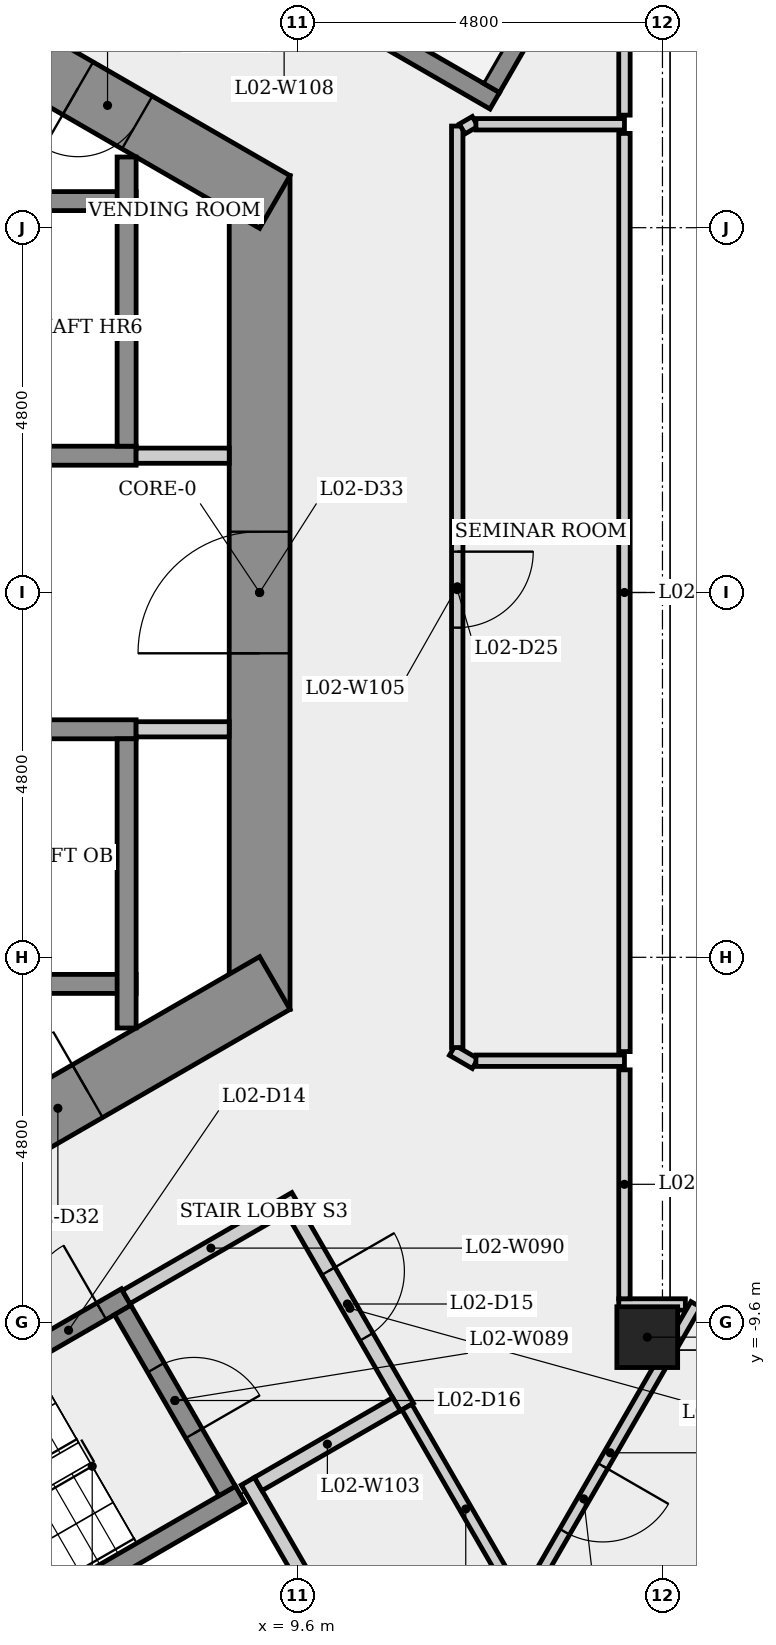
"""IFC4 building model, lengths in metres.
Left out: names, types, materials, properties, quantities, classifications, styles, units other than length and angle.
Written with IfcOpenShell. Run it as: python <this file> out.ifc"""

import sys

from ifc_helpers import new_model, si_unit, direction, frame, frame_2d, origin, origin_2d, place, context, subcontext, project, spatial, rectangle, extrude, element, fill, save


model = new_model("IFC4")
c1 = context("Model", 3, precision=1e-05, world=origin(), true_north=direction((0.0, 1.0)))
c2 = subcontext(c1, "Body", "Model", "MODEL_VIEW")
j1 = project(units=[si_unit("LENGTHUNIT", "METRE"), si_unit("PLANEANGLEUNIT", "RADIAN")], contexts=[c1])
p1 = place(None, origin())
s1 = spatial("IfcSite", under=j1, at=p1, CompositionType="ELEMENT")
p2 = place(p1, origin())
s2 = spatial("IfcBuilding", under=s1, at=p2, CompositionType="ELEMENT")
p3 = place(p2, frame((0.0, 0.0, 11.5)))
s3 = spatial("IfcBuildingStorey", under=s2, at=p3, CompositionType="ELEMENT", Elevation=11.5)
p4 = place(p3, frame((9.1, -5.485, 0.0), z_axis=(0.0, 0.0, 1.0), x_axis=(0.0, 1.0, 0.0)))
e1 = element("IfcWall", 1, at=p4, inside=s3, PredefinedType="SHEAR", context=c2, shape_type="SweptSolid", body=[
    extrude(rectangle(XDim=10.97, YDim=0.8, at=frame_2d((5.485, 0.0))), origin(), (0.0, 0.0, 1.0), 4.5),
])
p5 = place(p4, frame((4.685, 0.0, 0.0)))
e2 = element("IfcOpeningElement", 2, at=p5, cuts=e1, PredefinedType="OPENING", context=c2, shape_type="SweptSolid", body=[
    extrude(rectangle(XDim=1.6, YDim=2.1, at=frame_2d((0.8, 1.05))), frame((0.0, 0.41, 0.0), z_axis=(0.0, -1.0, 0.0), x_axis=(1.0, 0.0, 0.0)), (0.0, 0.0, 1.0), 0.82),
])
p6 = place(p3, frame((9.3, 5.138, 0.0), z_axis=(0.0, 0.0, 1.0), x_axis=(-0.866023993627, 0.500002442456, 0.0)))
e3 = element("IfcWall", 3, at=p6, inside=s3, PredefinedType="SHEAR", context=c2, shape_type="SweptSolid", body=[
    extrude(rectangle(XDim=10.97, YDim=0.8, at=frame_2d((5.485, 0.0))), origin(), (0.0, 0.0, 1.0), 4.5),
])
p7 = place(p6, frame((8.326, 0.0, 0.0)))
e4 = element("IfcOpeningElement", 4, at=p7, cuts=e3, PredefinedType="OPENING", context=c2, shape_type="SweptSolid", body=[
    extrude(rectangle(XDim=0.9, YDim=2.1, at=frame_2d((0.45, 1.05))), frame((0.0, 0.41, 0.0), z_axis=(0.0, -1.0, 0.0), x_axis=(1.0, 0.0, 0.0)), (0.0, 0.0, 1.0), 0.82),
])
p8 = place(p6, frame((2.091, 0.0, 0.0)))
e5 = element("IfcOpeningElement", 5, at=p8, cuts=e3, PredefinedType="OPENING", context=c2, shape_type="SweptSolid", body=[
    extrude(rectangle(XDim=0.9, YDim=2.1, at=frame_2d((0.45, 1.05))), frame((0.0, 0.41, 0.0), z_axis=(0.0, -1.0, 0.0), x_axis=(1.0, 0.0, 0.0)), (0.0, 0.0, 1.0), 0.82),
])
p9 = place(p3, frame((-0.2, -10.623, 0.0), z_axis=(0.0, 0.0, 1.0), x_axis=(0.866023993627, 0.500002442456, 0.0)))
e6 = element("IfcWall", 6, at=p9, inside=s3, PredefinedType="SHEAR", context=c2, shape_type="SweptSolid", body=[
    extrude(rectangle(XDim=10.97, YDim=0.8, at=frame_2d((5.485, 0.0))), origin(), (0.0, 0.0, 1.0), 4.5),
])
p10 = place(p9, frame((7.224, 0.0, 0.0)))
e7 = element("IfcOpeningElement", 7, at=p10, cuts=e6, PredefinedType="OPENING", context=c2, shape_type="SweptSolid", body=[
    extrude(rectangle(XDim=0.9, YDim=2.1, at=frame_2d((0.45, 1.05))), frame((0.0, 0.41, 0.0), z_axis=(0.0, -1.0, 0.0), x_axis=(1.0, 0.0, 0.0)), (0.0, 0.0, 1.0), 0.82),
])
p11 = place(p3, frame((14.2, -9.798, 0.0), z_axis=(0.0, 0.0, 1.0), x_axis=(1.0, 0.0, 0.0)))
e8 = element("IfcColumn", 8, at=p11, inside=s3, PredefinedType="COLUMN", context=c2, shape_type="SweptSolid", body=[
    extrude(rectangle(XDim=0.8, YDim=0.8, at=origin_2d()), origin(), (0.0, 0.0, 1.0), 4.5),
])
p12 = place(p3, frame((-7.475, 1.8, 0.0), z_axis=(0.0, 0.0, 1.0), x_axis=(1.0, 0.0, 0.0)))
e9 = element("IfcWall", 9, at=p12, inside=s3, PredefinedType="SHEAR", context=c2, shape_type="SweptSolid", body=[
    extrude(rectangle(XDim=14.95, YDim=0.25, at=frame_2d((7.475, 0.0))), origin(), (0.0, 0.0, 1.0), 4.1),
])
for number, where, z_axis, x_axis in (
    (10, (-7.225, 5.15, 0.0), (0.0, 0.0, 1.0), (1.0, 0.0, 0.0)),
    (11, (-7.225, -5.15, 0.0), (0.0, 0.0, 1.0), (1.0, 0.0, 0.0)),
):
    element("IfcWall", number, at=place(p3, frame(where, z_axis=z_axis, x_axis=x_axis)), inside=s3, PredefinedType="SHEAR", context=c2, shape_type="SweptSolid", body=[
        extrude(rectangle(XDim=14.7, YDim=0.25, at=frame_2d((7.35, 0.0))), origin(), (0.0, 0.0, 1.0), 4.1),
    ])
p13 = place(p3, frame((-7.225, -1.8, 0.0), z_axis=(0.0, 0.0, 1.0), x_axis=(1.0, 0.0, 0.0)))
e12 = element("IfcWall", 12, at=p13, inside=s3, PredefinedType="SHEAR", context=c2, shape_type="SweptSolid", body=[
    extrude(rectangle(XDim=14.7, YDim=0.25, at=frame_2d((7.35, 0.0))), origin(), (0.0, 0.0, 1.0), 4.1),
])
p14 = place(p13, frame((0.597, 0.0, 0.0)))
e13 = element("IfcOpeningElement", 13, at=p14, cuts=e12, PredefinedType="OPENING", context=c2, shape_type="SweptSolid", body=[
    extrude(rectangle(XDim=1.1, YDim=2.1, at=frame_2d((0.55, 1.05))), frame((0.0, 0.135, 0.0), z_axis=(0.0, -1.0, 0.0), x_axis=(1.0, 0.0, 0.0)), (0.0, 0.0, 1.0), 0.27),
])
p15 = place(p13, frame((3.0, 0.0, 0.0)))
e14 = element("IfcOpeningElement", 14, at=p15, cuts=e12, PredefinedType="OPENING", context=c2, shape_type="SweptSolid", body=[
    extrude(rectangle(XDim=1.1, YDim=2.1, at=frame_2d((0.55, 1.05))), frame((0.0, 0.135, 0.0), z_axis=(0.0, -1.0, 0.0), x_axis=(1.0, 0.0, 0.0)), (0.0, 0.0, 1.0), 0.27),
])
p16 = place(p13, frame((5.45, 0.0, 0.0)))
e15 = element("IfcOpeningElement", 15, at=p16, cuts=e12, PredefinedType="OPENING", context=c2, shape_type="SweptSolid", body=[
    extrude(rectangle(XDim=1.1, YDim=2.1, at=frame_2d((0.55, 1.05))), frame((0.0, 0.135, 0.0), z_axis=(0.0, -1.0, 0.0), x_axis=(1.0, 0.0, 0.0)), (0.0, 0.0, 1.0), 0.27),
])
p17 = place(p13, frame((7.9, 0.0, 0.0)))
e16 = element("IfcOpeningElement", 16, at=p17, cuts=e12, PredefinedType="OPENING", context=c2, shape_type="SweptSolid", body=[
    extrude(rectangle(XDim=1.1, YDim=2.1, at=frame_2d((0.55, 1.05))), frame((0.0, 0.135, 0.0), z_axis=(0.0, -1.0, 0.0), x_axis=(1.0, 0.0, 0.0)), (0.0, 0.0, 1.0), 0.27),
])
p18 = place(p13, frame((10.35, 0.0, 0.0)))
e17 = element("IfcOpeningElement", 17, at=p18, cuts=e12, PredefinedType="OPENING", context=c2, shape_type="SweptSolid", body=[
    extrude(rectangle(XDim=1.1, YDim=2.1, at=frame_2d((0.55, 1.05))), frame((0.0, 0.135, 0.0), z_axis=(0.0, -1.0, 0.0), x_axis=(1.0, 0.0, 0.0)), (0.0, 0.0, 1.0), 0.27),
])
p19 = place(p3, frame((1.585, -12.595, 0.0), z_axis=(0.0, 0.0, 1.0), x_axis=(0.866036417653, 0.499980922934, 0.0)))
e18 = element("IfcWall", 18, at=p19, inside=s3, PredefinedType="SHEAR", context=c2, shape_type="SweptSolid", body=[
    extrude(rectangle(XDim=6.65, YDim=0.25, at=frame_2d((3.325, 0.0))), origin(), (0.0, 0.0, 1.0), 4.1),
])
p20 = place(p19, frame((5.275, 0.0, 0.0)))
e19 = element("IfcOpeningElement", 19, at=p20, cuts=e18, PredefinedType="OPENING", context=c2, shape_type="SweptSolid", body=[
    extrude(rectangle(XDim=1.0, YDim=2.1, at=frame_2d((0.5, 1.05))), frame((0.0, 0.135, 0.0), z_axis=(0.0, -1.0, 0.0), x_axis=(1.0, 0.0, 0.0)), (0.0, 0.0, 1.0), 0.27),
])
p21 = place(p3, frame((3.301, -15.068, 0.0), z_axis=(0.0, 0.0, 1.0), x_axis=(0.866035036182, 0.499983315828, 0.0)))
e20 = element("IfcWall", 20, at=p21, inside=s3, PredefinedType="SHEAR", context=c2, shape_type="SweptSolid", body=[
    extrude(rectangle(XDim=6.4, YDim=0.25, at=frame_2d((3.2, 0.0))), origin(), (0.0, 0.0, 1.0), 4.1),
])
p22 = place(p3, frame((7.298, -9.441, 0.0), z_axis=(0.0, 0.0, 1.0), x_axis=(0.500034990121, -0.866005201286, 0.0)))
e21 = element("IfcWall", 21, at=p22, inside=s3, PredefinedType="SHEAR", context=c2, shape_type="SweptSolid", body=[
    extrude(rectangle(XDim=2.75, YDim=0.25, at=frame_2d((1.375, 0.0))), origin(), (0.0, 0.0, 1.0), 4.1),
])
p23 = place(p22, frame((0.875, 0.0, 0.0)))
e22 = element("IfcOpeningElement", 22, at=p23, cuts=e21, PredefinedType="OPENING", context=c2, shape_type="SweptSolid", body=[
    extrude(rectangle(XDim=1.0, YDim=2.1, at=frame_2d((0.5, 1.05))), frame((0.0, 0.135, 0.0), z_axis=(0.0, -1.0, 0.0), x_axis=(1.0, 0.0, 0.0)), (0.0, 0.0, 1.0), 0.27),
])
p24 = place(p3, frame((7.344, -9.27, 0.0), z_axis=(0.0, 0.0, 1.0), x_axis=(0.866005588531, 0.500034319456, 0.0)))
e23 = element("IfcWall", 23, at=p24, inside=s3, PredefinedType="PARTITIONING", context=c2, shape_type="SweptSolid", body=[
    extrude(rectangle(XDim=2.575, YDim=0.2, at=frame_2d((1.288, 0.0))), origin(), (0.0, 0.0, 1.0), 4.1),
])
p25 = place(p3, frame((7.475, 1.8, 0.0), z_axis=(0.0, 0.0, 1.0), x_axis=(1.0, 0.0, 0.0)))
e24 = element("IfcWall", 24, at=p25, inside=s3, PredefinedType="PARTITIONING", context=c2, shape_type="SweptSolid", body=[
    extrude(rectangle(XDim=1.225, YDim=0.2, at=frame_2d((0.613, 0.0))), origin(), (0.0, 0.0, 1.0), 4.1),
])
for number, where, z_axis, x_axis in (
    (25, (7.35, -1.925, 0.0), (0.0, 0.0, 1.0), (0.0, -1.0, 0.0)),
    (26, (7.35, 5.73, 0.0), (0.0, 0.0, 1.0), (0.0, -1.0, 0.0)),
):
    element("IfcWall", number, at=place(p3, frame(where, z_axis=z_axis, x_axis=x_axis)), inside=s3, PredefinedType="SHEAR", context=c2, shape_type="SweptSolid", body=[
        extrude(rectangle(XDim=3.805, YDim=0.25, at=frame_2d((1.903, 0.0))), origin(), (0.0, 0.0, 1.0), 4.1),
    ])
p26 = place(p3, frame((8.7, -1.8, 0.0), z_axis=(0.0, 0.0, 1.0), x_axis=(-1.0, 0.0, 0.0)))
e27 = element("IfcWall", 27, at=p26, inside=s3, PredefinedType="PARTITIONING", context=c2, shape_type="SweptSolid", body=[
    extrude(rectangle(XDim=1.225, YDim=0.2, at=frame_2d((0.613, 0.0))), origin(), (0.0, 0.0, 1.0), 4.1),
])
p27 = place(p3, frame((8.945, -11.694, 0.0), z_axis=(0.0, 0.0, 1.0), x_axis=(0.500062241894, -0.865989465428, 0.0)))
e28 = element("IfcWall", 28, at=p27, inside=s3, PredefinedType="PLUMBINGWALL", context=c2, shape_type="SweptSolid", body=[
    extrude(rectangle(XDim=3.4, YDim=0.2, at=frame_2d((1.7, 0.0))), origin(), (0.0, 0.0, 1.0), 4.1),
])
p28 = place(p3, frame((9.537, -8.119, 0.0), z_axis=(0.0, 0.0, 1.0), x_axis=(0.499990139034, -0.866031096941, 0.0)))
e29 = element("IfcWall", 29, at=p28, inside=s3, PredefinedType="PARTITIONING", context=c2, shape_type="SweptSolid", body=[
    extrude(rectangle(XDim=3.0, YDim=0.2, at=frame_2d((1.5, 0.0))), origin(), (0.0, 0.0, 1.0), 4.1),
])
p29 = place(p28, frame((0.935, 0.0, 0.0)))
e30 = element("IfcOpeningElement", 30, at=p29, cuts=e29, PredefinedType="OPENING", context=c2, shape_type="SweptSolid", body=[
    extrude(rectangle(XDim=1.0, YDim=2.1, at=frame_2d((0.5, 1.05))), frame((0.0, 0.11, 0.0), z_axis=(0.0, -1.0, 0.0), x_axis=(1.0, 0.0, 0.0)), (0.0, 0.0, 1.0), 0.22),
])
p30 = place(p3, frame((10.901, -10.681, 0.0), z_axis=(0.0, 0.0, 1.0), x_axis=(-0.866009402589, -0.500027713859, 0.0)))
e31 = element("IfcWall", 31, at=p30, inside=s3, PredefinedType="PARTITIONING", context=c2, shape_type="SweptSolid", body=[
    extrude(rectangle(XDim=2.1, YDim=0.2, at=frame_2d((1.05, 0.0))), origin(), (0.0, 0.0, 1.0), 4.1),
])
p31 = place(p3, frame((11.635, -6.025, 0.0), z_axis=(0.0, 0.0, 1.0), x_axis=(0.866115353951, -0.499844169366, 0.0)))
e32 = element("IfcWall", 32, at=p31, inside=s3, PredefinedType="PARTITIONING", context=c2, shape_type="SweptSolid", body=[
    extrude(rectangle(XDim=0.347, YDim=0.15, at=frame_2d((0.174, 0.0))), origin(), (0.0, 0.0, 1.0), 4.1),
])
p32 = place(p3, frame((11.7, 6.137, 0.0), z_axis=(0.0, 0.0, 1.0), x_axis=(0.0, -1.0, 0.0)))
e33 = element("IfcWall", 33, at=p32, inside=s3, PredefinedType="PARTITIONING", context=c2, shape_type="SweptSolid", body=[
    extrude(rectangle(XDim=12.125, YDim=0.15, at=frame_2d((6.062, 0.0))), origin(), (0.0, 0.0, 1.0), 4.1),
])
p33 = place(p32, frame((5.6, 0.0, 0.0)))
e34 = element("IfcOpeningElement", 34, at=p33, cuts=e33, PredefinedType="OPENING", context=c2, shape_type="SweptSolid", body=[
    extrude(rectangle(XDim=1.0, YDim=2.1, at=frame_2d((0.5, 1.05))), frame((0.0, 0.085, 0.0), z_axis=(0.0, -1.0, 0.0), x_axis=(1.0, 0.0, 0.0)), (0.0, 0.0, 1.0), 0.17),
])
p34 = place(p3, frame((11.946, -6.161, 0.0), z_axis=(0.0, 0.0, 1.0), x_axis=(1.0, 0.0, 0.0)))
e35 = element("IfcWall", 35, at=p34, inside=s3, PredefinedType="PARTITIONING", context=c2, shape_type="SweptSolid", body=[
    extrude(rectangle(XDim=1.954, YDim=0.15, at=frame_2d((0.977, 0.0))), origin(), (0.0, 0.0, 1.0), 4.1),
])
p35 = place(p3, frame((11.936, 6.198, 0.0), z_axis=(0.0, 0.0, 1.0), x_axis=(-0.866103179807, -0.499865263774, 0.0)))
e36 = element("IfcWall", 36, at=p35, inside=s3, PredefinedType="PARTITIONING", context=c2, shape_type="SweptSolid", body=[
    extrude(rectangle(XDim=0.197, YDim=0.15, at=frame_2d((0.099, 0.0))), origin(), (0.0, 0.0, 1.0), 4.1),
])
p36 = place(p3, frame((12.194, 6.47, 0.0), z_axis=(0.0, 0.0, 1.0), x_axis=(-0.866025499775, 0.499999833739, 0.0)))
e37 = element("IfcWall", 37, at=p36, inside=s3, PredefinedType="SHEAR", context=c2, shape_type="SweptSolid", body=[
    extrude(rectangle(XDim=6.4, YDim=0.25, at=frame_2d((3.2, 0.0))), origin(), (0.0, 0.0, 1.0), 4.1),
])
p37 = place(p36, frame((5.25, 0.0, 0.0)))
e38 = element("IfcOpeningElement", 38, at=p37, cuts=e37, PredefinedType="OPENING", context=c2, shape_type="SweptSolid", body=[
    extrude(rectangle(XDim=1.0, YDim=2.1, at=frame_2d((0.5, 1.05))), frame((0.0, 0.135, 0.0), z_axis=(0.0, -1.0, 0.0), x_axis=(1.0, 0.0, 0.0)), (0.0, 0.0, 1.0), 0.27),
])
p38 = place(p3, frame((12.587, -13.401, 0.0), z_axis=(0.0, 0.0, 1.0), x_axis=(-0.499952049853, 0.866053086045, 0.0)))
e39 = element("IfcWall", 39, at=p38, inside=s3, PredefinedType="PARTITIONING", context=c2, shape_type="SweptSolid", body=[
    extrude(rectangle(XDim=3.099, YDim=0.15, at=frame_2d((1.549, 0.0))), origin(), (0.0, 0.0, 1.0), 4.1),
])
p39 = place(p3, frame((13.755, 9.424, 0.0), z_axis=(0.0, 0.0, 1.0), x_axis=(-0.500011789842, -0.866018596809, 0.0)))
e40 = element("IfcWall", 40, at=p39, inside=s3, PredefinedType="SHEAR", context=c2, shape_type="SweptSolid", body=[
    extrude(rectangle(XDim=3.214, YDim=0.25, at=frame_2d((1.607, 0.0))), origin(), (0.0, 0.0, 1.0), 4.1),
])
p40 = place(p3, frame((13.825, -9.368, 0.0), z_axis=(0.0, 0.0, 1.0), x_axis=(1.0, 0.0, 0.0)))
e41 = element("IfcWall", 41, at=p40, inside=s3, PredefinedType="PARTITIONING", context=c2, shape_type="SweptSolid", body=[
    extrude(rectangle(XDim=0.877, YDim=0.15, at=frame_2d((0.438, 0.0))), origin(), (0.0, 0.0, 1.0), 3.175),
])
p41 = place(p3, frame((13.9, -6.281, 0.0), z_axis=(0.0, 0.0, 1.0), x_axis=(0.0, -1.0, 0.0)))
e42 = element("IfcWall", 42, at=p41, inside=s3, PredefinedType="PARTITIONING", context=c2, shape_type="SweptSolid", body=[
    extrude(rectangle(XDim=3.012, YDim=0.15, at=frame_2d((1.506, 0.0))), origin(), (0.0, 0.0, 1.0), 3.175),
])
p42 = place(p3, frame((13.9, 6.041, 0.0), z_axis=(0.0, 0.0, 1.0), x_axis=(0.0, -1.0, 0.0)))
e43 = element("IfcWall", 43, at=p42, inside=s3, PredefinedType="PARTITIONING", context=c2, shape_type="SweptSolid", body=[
    extrude(rectangle(XDim=12.082, YDim=0.15, at=frame_2d((6.041, 0.0))), origin(), (0.0, 0.0, 1.0), 3.175),
])
p43 = place(p3, frame((13.9, 6.161, 0.0), z_axis=(0.0, 0.0, 1.0), x_axis=(-1.0, 0.0, 0.0)))
e44 = element("IfcWall", 44, at=p43, inside=s3, PredefinedType="PARTITIONING", context=c2, shape_type="SweptSolid", body=[
    extrude(rectangle(XDim=1.954, YDim=0.15, at=frame_2d((0.977, 0.0))), origin(), (0.0, 0.0, 1.0), 4.1),
])
p44 = place(p3, frame((13.9, 9.443, 0.0), z_axis=(0.0, 0.0, 1.0), x_axis=(0.0, -1.0, 0.0)))
e45 = element("IfcWall", 45, at=p44, inside=s3, PredefinedType="PARTITIONING", context=c2, shape_type="SweptSolid", body=[
    extrude(rectangle(XDim=3.162, YDim=0.15, at=frame_2d((1.581, 0.0))), origin(), (0.0, 0.0, 1.0), 3.175),
])
p45 = place(p3, frame((14.84, -9.368, 0.0), z_axis=(0.0, 0.0, 1.0), x_axis=(-0.49999598783, -0.866027720199, 0.0)))
e46 = element("IfcWall", 46, at=p45, inside=s3, PredefinedType="PARTITIONING", context=c2, shape_type="SweptSolid", body=[
    extrude(rectangle(XDim=4.507, YDim=0.15, at=frame_2d((2.253, 0.0))), origin(), (0.0, 0.0, 1.0), 4.1),
])
p46 = place(p45, frame((2.453, 0.0, 0.0)))
e47 = element("IfcOpeningElement", 47, at=p46, cuts=e46, PredefinedType="OPENING", context=c2, shape_type="SweptSolid", body=[
    extrude(rectangle(XDim=1.0, YDim=2.1, at=frame_2d((0.5, 1.05))), frame((0.0, 0.085, 0.0), z_axis=(0.0, -1.0, 0.0), x_axis=(1.0, 0.0, 0.0)), (0.0, 0.0, 1.0), 0.17),
])
p47 = place(p20, origin())
e48 = element("IfcDoor", 48, at=p47, inside=s3, OperationType="SINGLE_SWING_RIGHT", PredefinedType="DOOR", context=c2, shape_type="SweptSolid", body=[
    extrude(rectangle(XDim=1.0, YDim=2.1, at=frame_2d((0.5, 1.05))), frame((0.0, 0.025, 0.0), z_axis=(0.0, -1.0, 0.0), x_axis=(1.0, 0.0, 0.0)), (0.0, 0.0, 1.0), 0.05),
])
fill(e19, e48)
p48 = place(p29, origin())
e49 = element("IfcDoor", 49, at=p48, inside=s3, OperationType="SINGLE_SWING_LEFT", PredefinedType="DOOR", context=c2, shape_type="SweptSolid", body=[
    extrude(rectangle(XDim=1.0, YDim=2.1, at=frame_2d((0.5, 1.05))), frame((0.0, 0.025, 0.0), z_axis=(0.0, -1.0, 0.0), x_axis=(1.0, 0.0, 0.0)), (0.0, 0.0, 1.0), 0.05),
])
fill(e30, e49)
p49 = place(p23, origin())
e50 = element("IfcDoor", 50, at=p49, inside=s3, OperationType="SINGLE_SWING_RIGHT", PredefinedType="DOOR", context=c2, shape_type="SweptSolid", body=[
    extrude(rectangle(XDim=1.0, YDim=2.1, at=frame_2d((0.5, 1.05))), frame((0.0, 0.025, 0.0), z_axis=(0.0, -1.0, 0.0), x_axis=(1.0, 0.0, 0.0)), (0.0, 0.0, 1.0), 0.05),
])
fill(e22, e50)
p50 = place(p46, origin())
e51 = element("IfcDoor", 51, at=p50, inside=s3, OperationType="SINGLE_SWING_LEFT", PredefinedType="DOOR", context=c2, shape_type="SweptSolid", body=[
    extrude(rectangle(XDim=1.0, YDim=2.1, at=frame_2d((0.5, 1.05))), frame((0.0, 0.025, 0.0), z_axis=(0.0, -1.0, 0.0), x_axis=(1.0, 0.0, 0.0)), (0.0, 0.0, 1.0), 0.05),
])
fill(e47, e51)
p51 = place(p33, origin())
e52 = element("IfcDoor", 52, at=p51, inside=s3, OperationType="SINGLE_SWING_LEFT", PredefinedType="DOOR", context=c2, shape_type="SweptSolid", body=[
    extrude(rectangle(XDim=1.0, YDim=2.1, at=frame_2d((0.5, 1.05))), frame((0.0, 0.025, 0.0), z_axis=(0.0, -1.0, 0.0), x_axis=(1.0, 0.0, 0.0)), (0.0, 0.0, 1.0), 0.05),
])
fill(e34, e52)
p52 = place(p8, origin())
e53 = element("IfcDoor", 53, at=p52, inside=s3, OperationType="SINGLE_SWING_RIGHT", PredefinedType="DOOR", context=c2, shape_type="SweptSolid", body=[
    extrude(rectangle(XDim=0.9, YDim=2.1, at=frame_2d((0.45, 1.05))), frame((0.0, 0.025, 0.0), z_axis=(0.0, -1.0, 0.0), x_axis=(1.0, 0.0, 0.0)), (0.0, 0.0, 1.0), 0.05),
])
fill(e5, e53)
p53 = place(p10, origin())
e54 = element("IfcDoor", 54, at=p53, inside=s3, OperationType="SINGLE_SWING_RIGHT", PredefinedType="DOOR", context=c2, shape_type="SweptSolid", body=[
    extrude(rectangle(XDim=0.9, YDim=2.1, at=frame_2d((0.45, 1.05))), frame((0.0, 0.025, 0.0), z_axis=(0.0, -1.0, 0.0), x_axis=(1.0, 0.0, 0.0)), (0.0, 0.0, 1.0), 0.05),
])
fill(e7, e54)
p54 = place(p5, origin())
e55 = element("IfcDoor", 55, at=p54, inside=s3, OperationType="SINGLE_SWING_LEFT", PredefinedType="DOOR", context=c2, shape_type="SweptSolid", body=[
    extrude(rectangle(XDim=1.6, YDim=2.1, at=frame_2d((0.8, 1.05))), frame((0.0, 0.025, 0.0), z_axis=(0.0, -1.0, 0.0), x_axis=(1.0, 0.0, 0.0)), (0.0, 0.0, 1.0), 0.05),
])
fill(e2, e55)
save(model, sys.argv[1])
